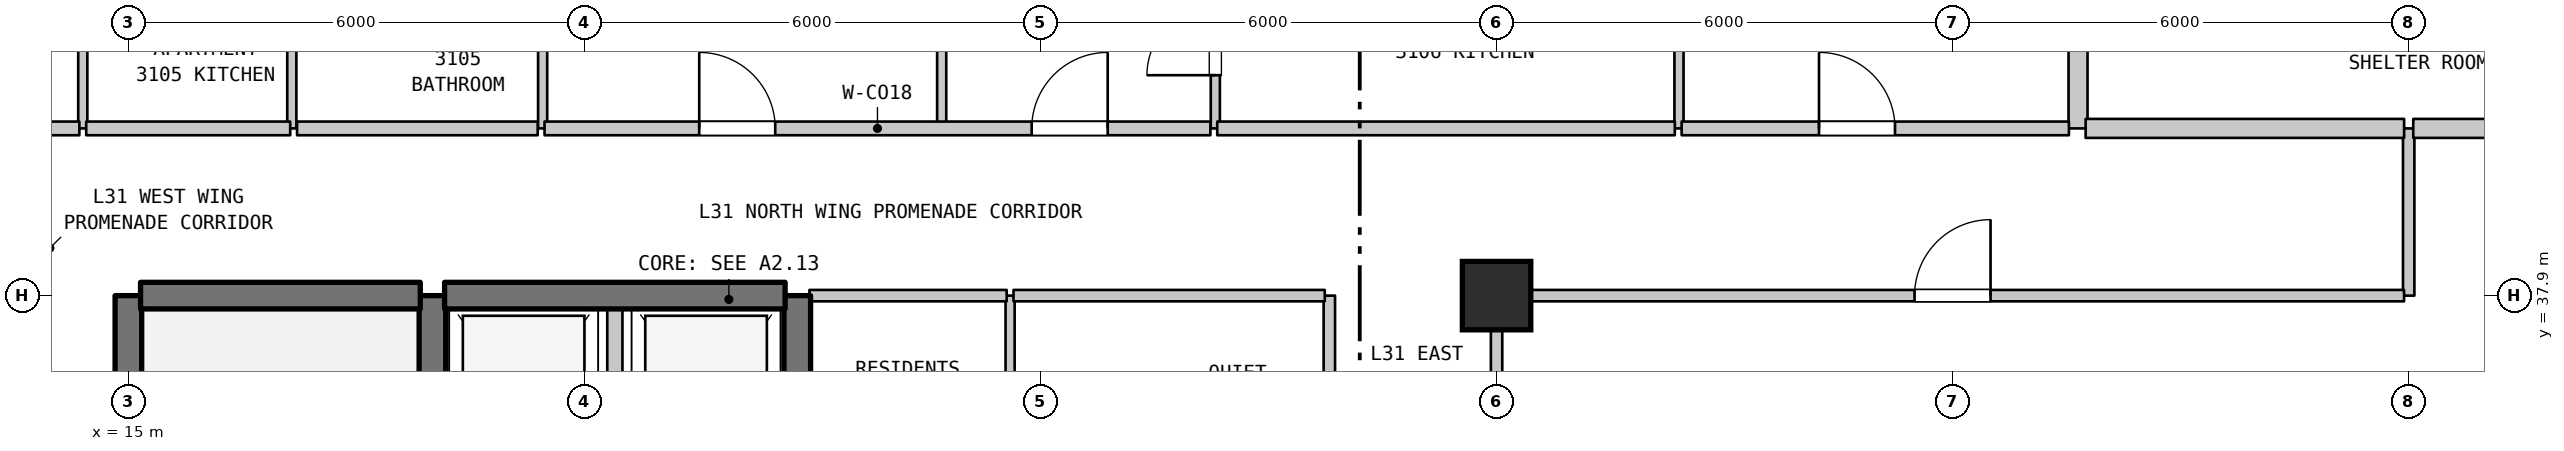
"""IFC4 building model, lengths in metres.
Left out: names, types, materials, properties, quantities, classifications, styles, units other than length and angle.
Written with IfcOpenShell. Run it as: python <this file> out.ifc"""

import sys

from ifc_helpers import new_model, si_unit, direction, frame, frame_2d, origin, origin_2d, place, context, subcontext, project, spatial, rectangle, extrude, element, fill, save


model = new_model("IFC4")
c1 = context("Model", 3, precision=1e-05, world=origin(), true_north=direction((0.0, 1.0)))
c2 = subcontext(c1, "Body", "Model", "MODEL_VIEW")
j1 = project(units=[si_unit("LENGTHUNIT", "METRE"), si_unit("PLANEANGLEUNIT", "RADIAN")], contexts=[c1])
p1 = place(None, origin())
s1 = spatial("IfcSite", under=j1, at=p1, CompositionType="ELEMENT")
p2 = place(p1, origin())
s2 = spatial("IfcBuilding", under=s1, at=p2, CompositionType="ELEMENT")
p3 = place(p2, frame((0.0, 0.0, 129.8)))
s3 = spatial("IfcBuildingStorey", under=s2, at=p3, CompositionType="ELEMENT", Elevation=129.8)
p4 = place(p3, frame((33.0, 37.9, 0.0), z_axis=(0.0, 0.0, 1.0), x_axis=(1.0, 0.0, 0.0)))
e1 = element("IfcColumn", 1, at=p4, inside=s3, PredefinedType="COLUMN", context=c2, shape_type="SweptSolid", body=[
    extrude(rectangle(XDim=0.9, YDim=0.9, at=origin_2d()), origin(), (0.0, 0.0, 1.0), 3.7),
])
p5 = place(p3, frame((14.4, 40.1, 0.0), z_axis=(0.0, 0.0, 1.0), x_axis=(0.0, 1.0, 0.0)))
e2 = element("IfcWall", 2, at=p5, inside=s3, PredefinedType="PARTITIONING", context=c2, shape_type="SweptSolid", body=[
    extrude(rectangle(XDim=2.3, YDim=0.12, at=frame_2d((1.15, 0.0))), origin(), (0.0, 0.0, 1.0), 3.385),
])
p6 = place(p3, frame((15.0, 31.1, 0.0), z_axis=(0.0, 0.0, 1.0), x_axis=(0.0, 1.0, 0.0)))
e3 = element("IfcWall", 3, at=p6, inside=s3, PredefinedType="SHEAR", context=c2, shape_type="SweptSolid", body=[
    extrude(rectangle(XDim=6.8, YDim=0.35, at=frame_2d((3.4, 0.0))), origin(), (0.0, 0.0, 1.0), 3.385),
])
p7 = place(p3, frame((17.15, 40.1, 0.0), z_axis=(0.0, 0.0, 1.0), x_axis=(0.0, 1.0, 0.0)))
e4 = element("IfcWall", 4, at=p7, inside=s3, PredefinedType="PARTITIONING", context=c2, shape_type="SweptSolid", body=[
    extrude(rectangle(XDim=2.3, YDim=0.12, at=frame_2d((1.15, 0.0))), origin(), (0.0, 0.0, 1.0), 3.385),
])
p8 = place(p3, frame((19.0, 35.0, 0.0), z_axis=(0.0, 0.0, 1.0), x_axis=(0.0, 1.0, 0.0)))
e5 = element("IfcWall", 5, at=p8, inside=s3, PredefinedType="SHEAR", context=c2, shape_type="SweptSolid", body=[
    extrude(rectangle(XDim=2.9, YDim=0.35, at=frame_2d((1.45, 0.0))), origin(), (0.0, 0.0, 1.0), 3.385),
])
p9 = place(p3, frame((20.45, 40.1, 0.0), z_axis=(0.0, 0.0, 1.0), x_axis=(0.0, 1.0, 0.0)))
e6 = element("IfcWall", 6, at=p9, inside=s3, PredefinedType="PARTITIONING", context=c2, shape_type="SweptSolid", body=[
    extrude(rectangle(XDim=2.3, YDim=0.12, at=frame_2d((1.15, 0.0))), origin(), (0.0, 0.0, 1.0), 3.385),
])
p10 = place(p3, frame((21.4, 35.0, 0.0), z_axis=(0.0, 0.0, 1.0), x_axis=(0.0, 1.0, 0.0)))
e7 = element("IfcWall", 7, at=p10, inside=s3, PredefinedType="STANDARD", context=c2, shape_type="SweptSolid", body=[
    extrude(rectangle(XDim=2.9, YDim=0.2, at=frame_2d((1.45, 0.0))), origin(), (0.0, 0.0, 1.0), 3.385),
])
p11 = place(p3, frame((23.8, 35.0, 0.0), z_axis=(0.0, 0.0, 1.0), x_axis=(0.0, 1.0, 0.0)))
e8 = element("IfcWall", 8, at=p11, inside=s3, PredefinedType="SHEAR", context=c2, shape_type="SweptSolid", body=[
    extrude(rectangle(XDim=2.9, YDim=0.35, at=frame_2d((1.45, 0.0))), origin(), (0.0, 0.0, 1.0), 3.385),
])
p12 = place(p3, frame((25.7, 40.1, 0.0), z_axis=(0.0, 0.0, 1.0), x_axis=(0.0, 1.0, 0.0)))
e9 = element("IfcWall", 9, at=p12, inside=s3, PredefinedType="PARTITIONING", context=c2, shape_type="SweptSolid", body=[
    extrude(rectangle(XDim=2.05, YDim=0.12, at=frame_2d((1.025, 0.0))), origin(), (0.0, 0.0, 1.0), 3.385),
])
p13 = place(p3, frame((26.6, 35.0, 0.0), z_axis=(0.0, 0.0, 1.0), x_axis=(0.0, 1.0, 0.0)))
e10 = element("IfcWall", 10, at=p13, inside=s3, PredefinedType="PARTITIONING", context=c2, shape_type="SweptSolid", body=[
    extrude(rectangle(XDim=2.9, YDim=0.12, at=frame_2d((1.45, 0.0))), origin(), (0.0, 0.0, 1.0), 3.385),
])
p14 = place(p3, frame((29.3, 40.1, 0.0), z_axis=(0.0, 0.0, 1.0), x_axis=(0.0, 1.0, 0.0)))
e11 = element("IfcWall", 11, at=p14, inside=s3, PredefinedType="PARTITIONING", context=c2, shape_type="SweptSolid", body=[
    extrude(rectangle(XDim=2.3, YDim=0.12, at=frame_2d((1.15, 0.0))), origin(), (0.0, 0.0, 1.0), 3.385),
])
p15 = place(p14, frame((0.7, 0.0, 0.0)))
e12 = element("IfcOpeningElement", 12, at=p15, cuts=e11, PredefinedType="OPENING", context=c2, shape_type="SweptSolid", body=[
    extrude(rectangle(XDim=0.9, YDim=2.15, at=frame_2d((0.45, 1.075))), frame((0.0, 0.07, 0.0), z_axis=(0.0, -1.0, 0.0), x_axis=(1.0, 0.0, 0.0)), (0.0, 0.0, 1.0), 0.14),
])
p16 = place(p3, frame((30.8, 35.0, 0.0), z_axis=(0.0, 0.0, 1.0), x_axis=(0.0, 1.0, 0.0)))
e13 = element("IfcWall", 13, at=p16, inside=s3, PredefinedType="STANDARD", context=c2, shape_type="SweptSolid", body=[
    extrude(rectangle(XDim=2.9, YDim=0.15, at=frame_2d((1.45, 0.0))), origin(), (0.0, 0.0, 1.0), 3.385),
])
p17 = place(p3, frame((33.0, 32.54, 0.0), z_axis=(0.0, 0.0, 1.0), x_axis=(0.0, 1.0, 0.0)))
e14 = element("IfcWall", 14, at=p17, inside=s3, PredefinedType="STANDARD", context=c2, shape_type="SweptSolid", body=[
    extrude(rectangle(XDim=5.36, YDim=0.15, at=frame_2d((2.68, 0.0))), origin(), (0.0, 0.0, 1.0), 2.885),
])
p18 = place(p17, frame((2.109, 0.0, 0.0)))
e15 = element("IfcOpeningElement", 15, at=p18, cuts=e14, PredefinedType="OPENING", context=c2, shape_type="SweptSolid", body=[
    extrude(rectangle(XDim=1.0, YDim=2.15, at=frame_2d((0.5, 1.075))), frame((0.0, 0.085, 0.0), z_axis=(0.0, -1.0, 0.0), x_axis=(1.0, 0.0, 0.0)), (0.0, 0.0, 1.0), 0.17),
])
p19 = place(p3, frame((35.4, 40.1, 0.0), z_axis=(0.0, 0.0, 1.0), x_axis=(0.0, 1.0, 0.0)))
e16 = element("IfcWall", 16, at=p19, inside=s3, PredefinedType="PARTITIONING", context=c2, shape_type="SweptSolid", body=[
    extrude(rectangle(XDim=2.05, YDim=0.12, at=frame_2d((1.025, 0.0))), origin(), (0.0, 0.0, 1.0), 3.385),
])
p20 = place(p3, frame((40.65, 40.1, 0.0), z_axis=(0.0, 0.0, 1.0), x_axis=(0.0, 1.0, 0.0)))
e17 = element("IfcWall", 17, at=p20, inside=s3, PredefinedType="STANDARD", context=c2, shape_type="SweptSolid", body=[
    extrude(rectangle(XDim=2.3, YDim=0.25, at=frame_2d((1.15, 0.0))), origin(), (0.0, 0.0, 1.0), 3.385),
])
p21 = place(p3, frame((45.0, 37.9, 0.0), z_axis=(0.0, 0.0, 1.0), x_axis=(0.0, 1.0, 0.0)))
e18 = element("IfcWall", 18, at=p21, inside=s3, PredefinedType="STANDARD", context=c2, shape_type="SweptSolid", body=[
    extrude(rectangle(XDim=2.2, YDim=0.15, at=frame_2d((1.1, 0.0))), origin(), (0.0, 0.0, 1.0), 3.385),
])
p22 = place(p3, frame((15.16, 37.9, 0.0), z_axis=(0.0, 0.0, 1.0), x_axis=(1.0, 0.0, 0.0)))
e19 = element("IfcWall", 19, at=p22, inside=s3, PredefinedType="SHEAR", context=c2, shape_type="SweptSolid", body=[
    extrude(rectangle(XDim=3.68, YDim=0.35, at=frame_2d((1.84, 0.0))), origin(), (0.0, 0.0, 1.0), 3.385),
])
p23 = place(p3, frame((19.16, 37.9, 0.0), z_axis=(0.0, 0.0, 1.0), x_axis=(1.0, 0.0, 0.0)))
e20 = element("IfcWall", 20, at=p23, inside=s3, PredefinedType="SHEAR", context=c2, shape_type="SweptSolid", body=[
    extrude(rectangle(XDim=4.48, YDim=0.35, at=frame_2d((2.24, 0.0))), origin(), (0.0, 0.0, 1.0), 3.385),
])
p24 = place(p3, frame((23.96, 37.9, 0.0), z_axis=(0.0, 0.0, 1.0), x_axis=(1.0, 0.0, 0.0)))
e21 = element("IfcWall", 21, at=p24, inside=s3, PredefinedType="STANDARD", context=c2, shape_type="SweptSolid", body=[
    extrude(rectangle(XDim=2.595, YDim=0.15, at=frame_2d((1.297, 0.0))), origin(), (0.0, 0.0, 1.0), 2.885),
])
p25 = place(p3, frame((26.645, 37.9, 0.0), z_axis=(0.0, 0.0, 1.0), x_axis=(1.0, 0.0, 0.0)))
e22 = element("IfcWall", 22, at=p25, inside=s3, PredefinedType="STANDARD", context=c2, shape_type="SweptSolid", body=[
    extrude(rectangle(XDim=4.095, YDim=0.15, at=frame_2d((2.047, 0.0))), origin(), (0.0, 0.0, 1.0), 2.885),
])
p26 = place(p3, frame((33.06, 37.9, 0.0), z_axis=(0.0, 0.0, 1.0), x_axis=(1.0, 0.0, 0.0)))
e23 = element("IfcWall", 23, at=p26, inside=s3, PredefinedType="STANDARD", context=c2, shape_type="SweptSolid", body=[
    extrude(rectangle(XDim=11.879, YDim=0.15, at=frame_2d((5.939, 0.0))), origin(), (0.0, 0.0, 1.0), 3.385),
])
p27 = place(p26, frame((5.439, 0.0, 0.0)))
e24 = element("IfcOpeningElement", 24, at=p27, cuts=e23, PredefinedType="OPENING", context=c2, shape_type="SweptSolid", body=[
    extrude(rectangle(XDim=1.0, YDim=2.15, at=frame_2d((0.5, 1.075))), frame((0.0, 0.085, 0.0), z_axis=(0.0, -1.0, 0.0), x_axis=(1.0, 0.0, 0.0)), (0.0, 0.0, 1.0), 0.17),
])
p28 = place(p3, frame((12.875, 40.1, 0.0), z_axis=(0.0, 0.0, 1.0), x_axis=(1.0, 0.0, 0.0)))
e25 = element("IfcWall", 25, at=p28, inside=s3, PredefinedType="STANDARD", context=c2, shape_type="SweptSolid", body=[
    extrude(rectangle(XDim=1.48, YDim=0.18, at=frame_2d((0.74, 0.0))), origin(), (0.0, 0.0, 1.0), 3.385),
])
p29 = place(p3, frame((14.445, 40.1, 0.0), z_axis=(0.0, 0.0, 1.0), x_axis=(1.0, 0.0, 0.0)))
e26 = element("IfcWall", 26, at=p29, inside=s3, PredefinedType="STANDARD", context=c2, shape_type="SweptSolid", body=[
    extrude(rectangle(XDim=2.684, YDim=0.18, at=frame_2d((1.342, 0.0))), origin(), (0.0, 0.0, 1.0), 3.385),
])
p30 = place(p3, frame((17.219, 40.1, 0.0), z_axis=(0.0, 0.0, 1.0), x_axis=(1.0, 0.0, 0.0)))
e27 = element("IfcWall", 27, at=p30, inside=s3, PredefinedType="STANDARD", context=c2, shape_type="SweptSolid", body=[
    extrude(rectangle(XDim=3.166, YDim=0.18, at=frame_2d((1.583, 0.0))), origin(), (0.0, 0.0, 1.0), 3.385),
])
p31 = place(p3, frame((20.475, 40.1, 0.0), z_axis=(0.0, 0.0, 1.0), x_axis=(1.0, 0.0, 0.0)))
e28 = element("IfcWall", 28, at=p31, inside=s3, PredefinedType="STANDARD", context=c2, shape_type="SweptSolid", body=[
    extrude(rectangle(XDim=8.76, YDim=0.18, at=frame_2d((4.38, 0.0))), origin(), (0.0, 0.0, 1.0), 3.385),
])
p32 = place(p31, frame((2.035, 0.0, 0.0)))
e29 = element("IfcOpeningElement", 29, at=p32, cuts=e28, PredefinedType="OPENING", context=c2, shape_type="SweptSolid", body=[
    extrude(rectangle(XDim=1.0, YDim=2.15, at=frame_2d((0.5, 1.075))), frame((0.0, 0.1, 0.0), z_axis=(0.0, -1.0, 0.0), x_axis=(1.0, 0.0, 0.0)), (0.0, 0.0, 1.0), 0.2),
])
p33 = place(p31, frame((6.409, 0.0, 0.0)))
e30 = element("IfcOpeningElement", 30, at=p33, cuts=e28, PredefinedType="OPENING", context=c2, shape_type="SweptSolid", body=[
    extrude(rectangle(XDim=1.0, YDim=2.15, at=frame_2d((0.5, 1.075))), frame((0.0, 0.1, 0.0), z_axis=(0.0, -1.0, 0.0), x_axis=(1.0, 0.0, 0.0)), (0.0, 0.0, 1.0), 0.2),
])
p34 = place(p3, frame((29.325, 40.1, 0.0), z_axis=(0.0, 0.0, 1.0), x_axis=(1.0, 0.0, 0.0)))
e31 = element("IfcWall", 31, at=p34, inside=s3, PredefinedType="STANDARD", context=c2, shape_type="SweptSolid", body=[
    extrude(rectangle(XDim=6.02, YDim=0.18, at=frame_2d((3.01, 0.0))), origin(), (0.0, 0.0, 1.0), 3.385),
])
p35 = place(p3, frame((35.435, 40.1, 0.0), z_axis=(0.0, 0.0, 1.0), x_axis=(1.0, 0.0, 0.0)))
e32 = element("IfcWall", 32, at=p35, inside=s3, PredefinedType="STANDARD", context=c2, shape_type="SweptSolid", body=[
    extrude(rectangle(XDim=5.095, YDim=0.18, at=frame_2d((2.547, 0.0))), origin(), (0.0, 0.0, 1.0), 3.385),
])
p36 = place(p35, frame((1.807, 0.0, 0.0)))
e33 = element("IfcOpeningElement", 33, at=p36, cuts=e32, PredefinedType="OPENING", context=c2, shape_type="SweptSolid", body=[
    extrude(rectangle(XDim=1.0, YDim=2.15, at=frame_2d((0.5, 1.075))), frame((0.0, 0.1, 0.0), z_axis=(0.0, -1.0, 0.0), x_axis=(1.0, 0.0, 0.0)), (0.0, 0.0, 1.0), 0.2),
])
p37 = place(p3, frame((40.75, 40.1, 0.0), z_axis=(0.0, 0.0, 1.0), x_axis=(1.0, 0.0, 0.0)))
e34 = element("IfcWall", 34, at=p37, inside=s3, PredefinedType="STANDARD", context=c2, shape_type="SweptSolid", body=[
    extrude(rectangle(XDim=4.19, YDim=0.25, at=frame_2d((2.095, 0.0))), origin(), (0.0, 0.0, 1.0), 3.385),
])
p38 = place(p3, frame((45.06, 40.1, 0.0), z_axis=(0.0, 0.0, 1.0), x_axis=(1.0, 0.0, 0.0)))
e35 = element("IfcWall", 35, at=p38, inside=s3, PredefinedType="STANDARD", context=c2, shape_type="SweptSolid", body=[
    extrude(rectangle(XDim=1.49, YDim=0.25, at=frame_2d((0.745, 0.0))), origin(), (0.0, 0.0, 1.0), 3.385),
])
p39 = place(p15, origin())
e36 = element("IfcDoor", 36, at=p39, inside=s3, OperationType="SINGLE_SWING_LEFT", PredefinedType="DOOR", context=c2, shape_type="SweptSolid", body=[
    extrude(rectangle(XDim=0.9, YDim=2.15, at=frame_2d((0.45, 1.075))), frame((0.0, 0.025, 0.0), z_axis=(0.0, -1.0, 0.0), x_axis=(1.0, 0.0, 0.0)), (0.0, 0.0, 1.0), 0.05),
])
fill(e12, e36)
p40 = place(p27, origin())
e37 = element("IfcDoor", 37, at=p40, inside=s3, OperationType="SINGLE_SWING_RIGHT", PredefinedType="DOOR", context=c2, shape_type="SweptSolid", body=[
    extrude(rectangle(XDim=1.0, YDim=2.15, at=frame_2d((0.5, 1.075))), frame((0.0, 0.025, 0.0), z_axis=(0.0, -1.0, 0.0), x_axis=(1.0, 0.0, 0.0)), (0.0, 0.0, 1.0), 0.05),
])
fill(e24, e37)
p41 = place(p32, origin())
e38 = element("IfcDoor", 38, at=p41, inside=s3, OperationType="SINGLE_SWING_LEFT", PredefinedType="DOOR", context=c2, shape_type="SweptSolid", body=[
    extrude(rectangle(XDim=1.0, YDim=2.15, at=frame_2d((0.5, 1.075))), frame((0.0, 0.025, 0.0), z_axis=(0.0, -1.0, 0.0), x_axis=(1.0, 0.0, 0.0)), (0.0, 0.0, 1.0), 0.05),
])
fill(e29, e38)
p42 = place(p33, origin())
e39 = element("IfcDoor", 39, at=p42, inside=s3, OperationType="SINGLE_SWING_RIGHT", PredefinedType="DOOR", context=c2, shape_type="SweptSolid", body=[
    extrude(rectangle(XDim=1.0, YDim=2.15, at=frame_2d((0.5, 1.075))), frame((0.0, 0.025, 0.0), z_axis=(0.0, -1.0, 0.0), x_axis=(1.0, 0.0, 0.0)), (0.0, 0.0, 1.0), 0.05),
])
fill(e30, e39)
p43 = place(p36, origin())
e40 = element("IfcDoor", 40, at=p43, inside=s3, OperationType="SINGLE_SWING_LEFT", PredefinedType="DOOR", context=c2, shape_type="SweptSolid", body=[
    extrude(rectangle(XDim=1.0, YDim=2.15, at=frame_2d((0.5, 1.075))), frame((0.0, 0.025, 0.0), z_axis=(0.0, -1.0, 0.0), x_axis=(1.0, 0.0, 0.0)), (0.0, 0.0, 1.0), 0.05),
])
fill(e33, e40)
save(model, sys.argv[1])
